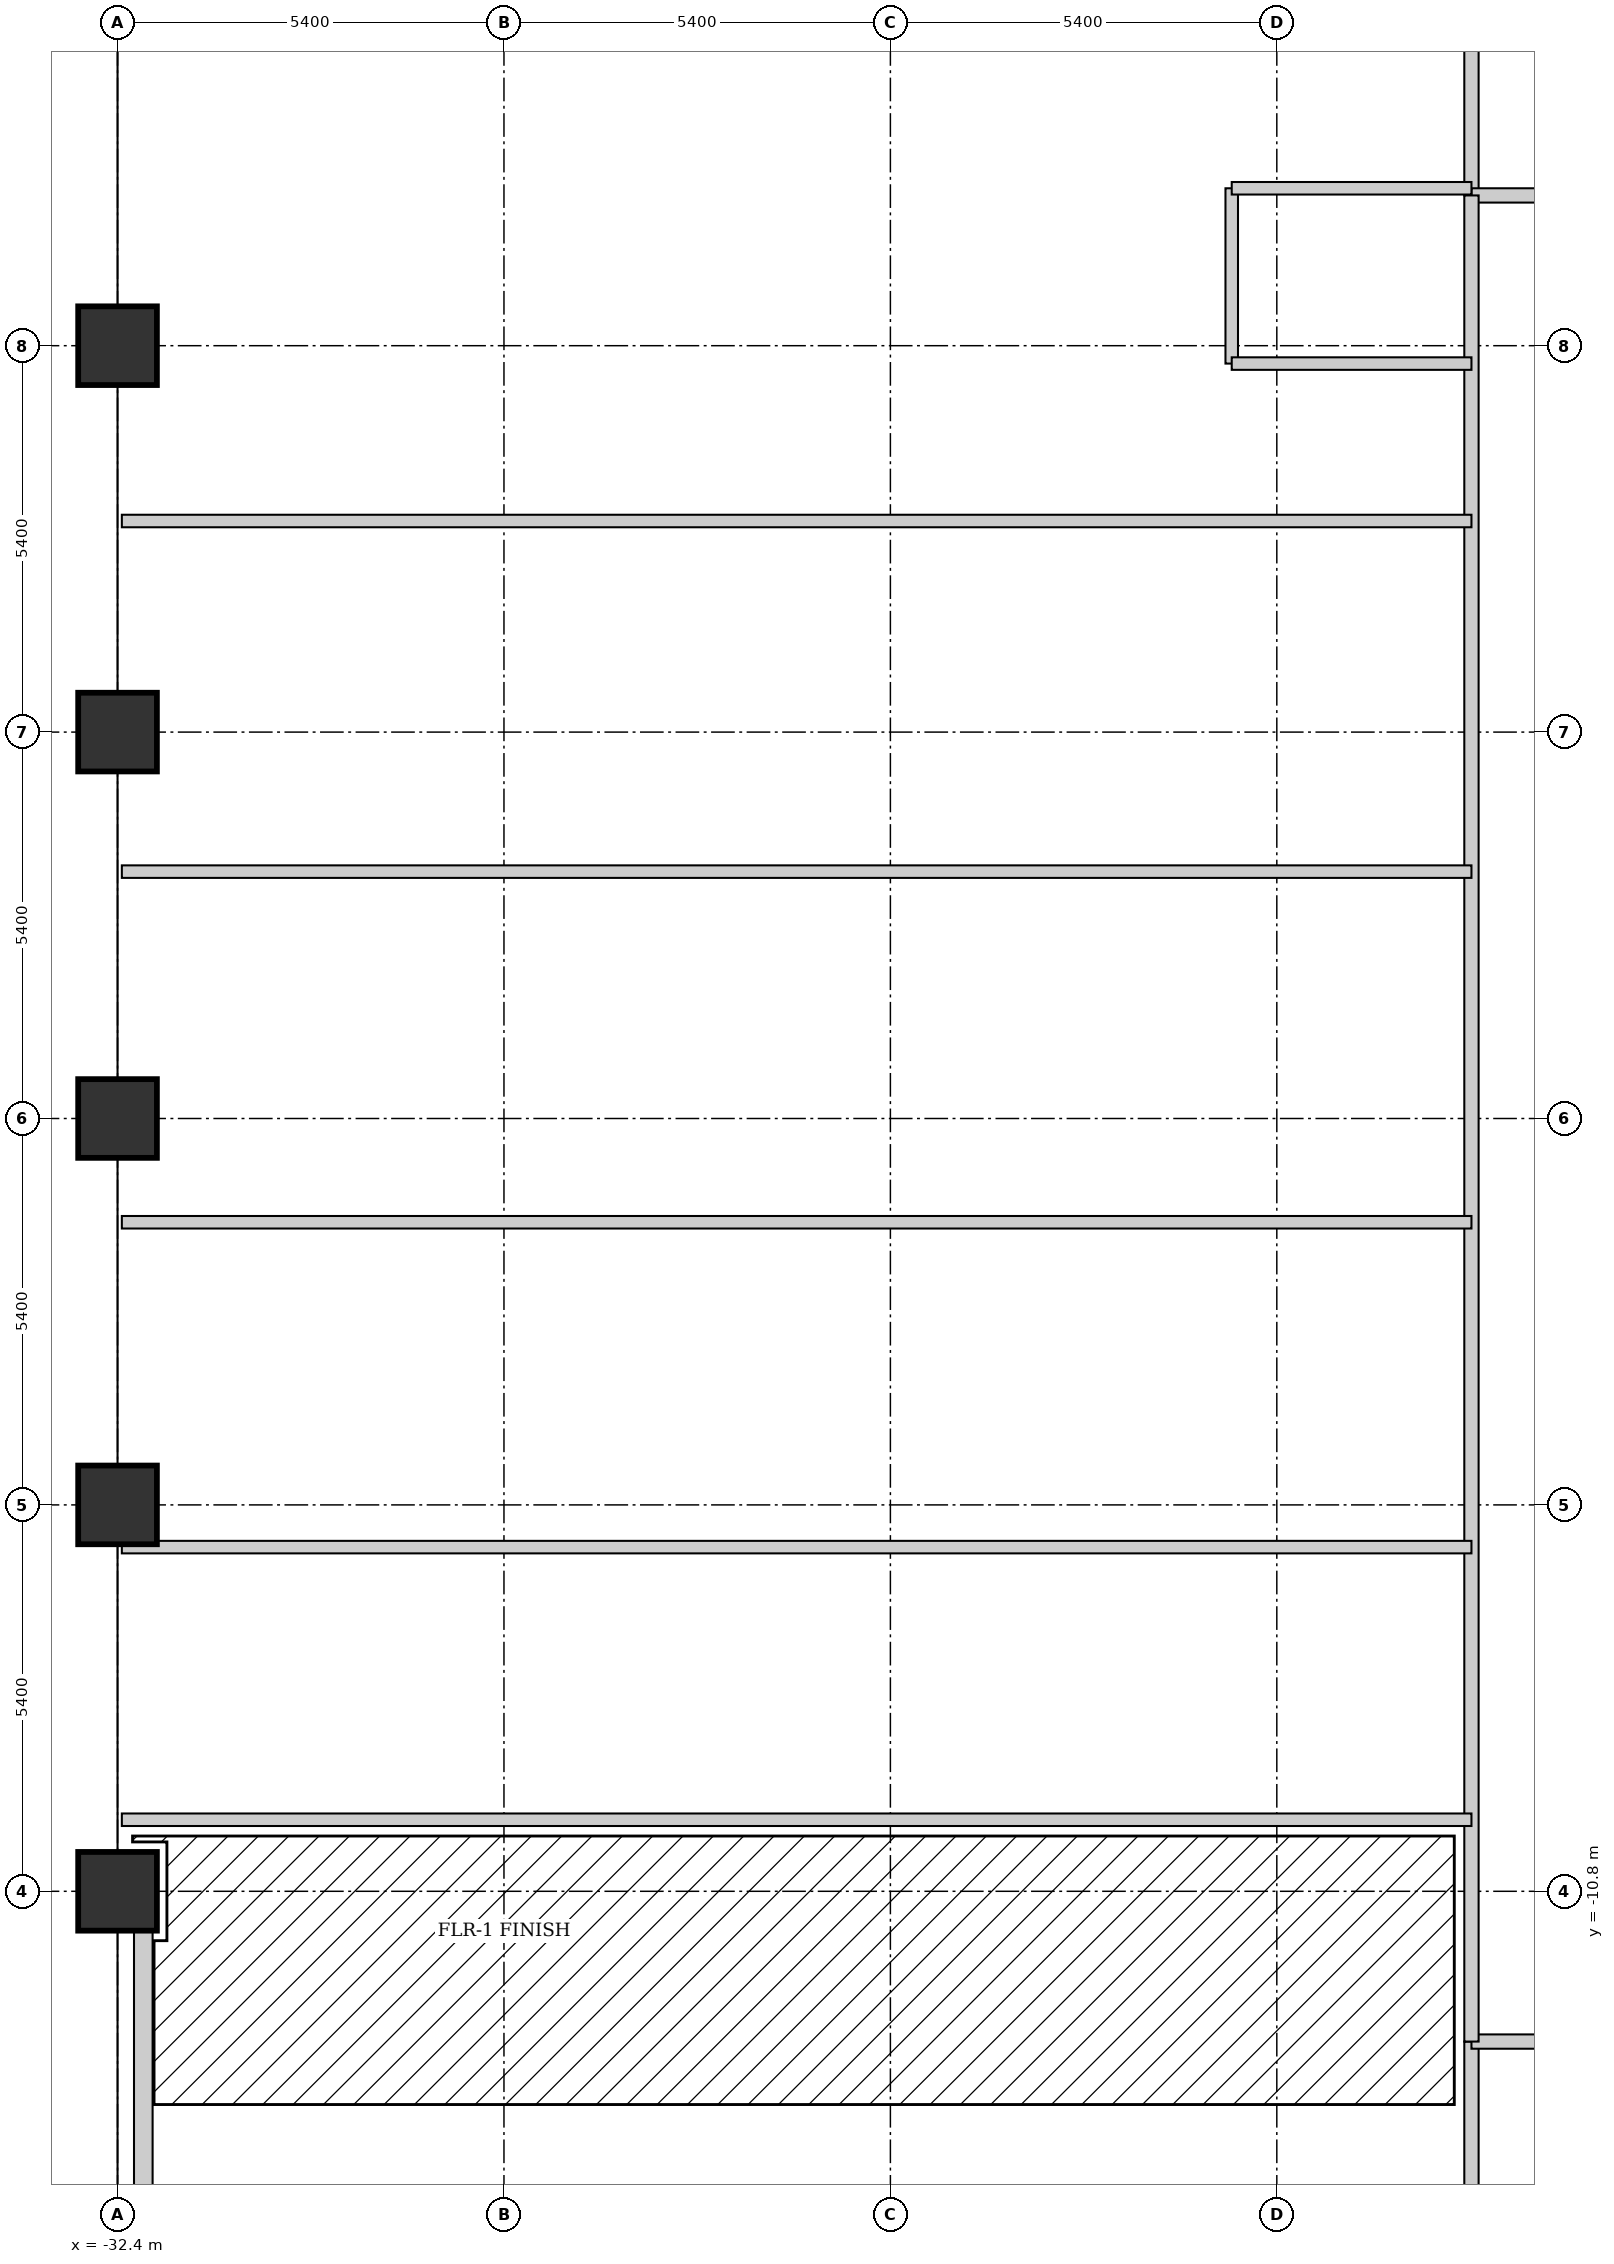
"""IFC4 building model, lengths in metres.
Left out: names, types, materials, properties, quantities, classifications, styles, units other than length and angle.
Written with IfcOpenShell. Run it as: python <this file> out.ifc"""

import sys

from ifc_helpers import new_model, si_unit, direction, frame, frame_2d, origin, origin_2d, place, context, subcontext, project, spatial, rectangle, extrude, element, fill, save


model = new_model("IFC4")
c1 = context("Model", 3, precision=1e-05, world=origin(), true_north=direction((0.0, 1.0)))
c2 = subcontext(c1, "Body", "Model", "MODEL_VIEW")
j1 = project(units=[si_unit("LENGTHUNIT", "METRE"), si_unit("PLANEANGLEUNIT", "RADIAN")], contexts=[c1])
p1 = place(None, origin())
s1 = spatial("IfcSite", under=j1, at=p1, CompositionType="ELEMENT")
p2 = place(p1, origin())
s2 = spatial("IfcBuilding", under=s1, at=p2, CompositionType="ELEMENT")
p3 = place(p2, frame((0.0, 0.0, 83.25)))
s3 = spatial("IfcBuildingStorey", under=s2, at=p3, CompositionType="ELEMENT", Elevation=83.25)
for number, where, z_axis, x_axis in (
    (1, (-32.4, -10.8, 0.0), (0.0, 0.0, 1.0), (1.0, 0.0, 0.0)),
    (2, (-32.4, -5.4, 0.0), (0.0, 0.0, 1.0), (1.0, 0.0, 0.0)),
    (3, (-32.4, 0.0, 0.0), (0.0, 0.0, 1.0), (1.0, 0.0, 0.0)),
    (4, (-32.4, 5.4, 0.0), (0.0, 0.0, 1.0), (1.0, 0.0, 0.0)),
    (5, (-32.4, 10.8, 0.0), (0.0, 0.0, 1.0), (1.0, 0.0, 0.0)),
):
    element("IfcColumn", number, at=place(p3, frame(where, z_axis=z_axis, x_axis=x_axis)), inside=s3, PredefinedType="COLUMN", context=c2, shape_type="SweptSolid", body=[
        extrude(rectangle(XDim=1.1, YDim=1.1, at=origin_2d()), origin(), (0.0, 0.0, 1.0), 3.75),
    ])
p4 = place(p3, frame((-32.04, -11.348, 0.0), z_axis=(0.0, 0.0, 1.0), x_axis=(0.0, -1.0, 0.0)))
e6 = element("IfcWall", 6, at=p4, inside=s3, PredefinedType="STANDARD", context=c2, shape_type="SweptSolid", body=[
    extrude(rectangle(XDim=4.304, YDim=0.26, at=frame_2d((2.152, 0.0))), origin(), (0.0, 0.0, 1.0), 2.699),
])
for number, where, z_axis, x_axis in (
    (7, (-13.48, 12.9, 0.0), (0.0, 0.0, 1.0), (0.0, 1.0, 0.0)),
    (8, (-13.48, -25.84, 0.0), (0.0, 0.0, 1.0), (0.0, 1.0, 0.0)),
):
    element("IfcWall", number, at=place(p3, frame(where, z_axis=z_axis, x_axis=x_axis)), inside=s3, PredefinedType="PARTITIONING", context=c2, shape_type="SweptSolid", body=[
        extrude(rectangle(XDim=12.94, YDim=0.2, at=frame_2d((6.47, 0.0))), origin(), (0.0, 0.0, 1.0), 2.699),
    ])
p5 = place(p3, frame((-13.48, 12.9, 0.0), z_axis=(0.0, 0.0, 1.0), x_axis=(1.0, 0.0, 0.0)))
e9 = element("IfcWall", 9, at=p5, inside=s3, PredefinedType="PARTITIONING", context=c2, shape_type="SweptSolid", body=[
    extrude(rectangle(XDim=12.18, YDim=0.2, at=frame_2d((6.09, 0.0))), origin(), (0.0, 0.0, 1.0), 2.933),
])
p6 = place(p5, frame((1.255, 0.0, 0.0)))
e10 = element("IfcOpeningElement", 10, at=p6, cuts=e9, PredefinedType="OPENING", context=c2, shape_type="SweptSolid", body=[
    extrude(rectangle(XDim=0.85, YDim=2.1, at=frame_2d((0.425, 1.05))), frame((0.0, 0.11, 0.0), z_axis=(0.0, -1.0, 0.0), x_axis=(1.0, 0.0, 0.0)), (0.0, 0.0, 1.0), 0.22),
])
p7 = place(p5, frame((4.9, 0.0, 0.0)))
e11 = element("IfcOpeningElement", 11, at=p7, cuts=e9, PredefinedType="OPENING", context=c2, shape_type="SweptSolid", body=[
    extrude(rectangle(XDim=0.95, YDim=2.1, at=frame_2d((0.475, 1.05))), frame((0.0, 0.11, 0.0), z_axis=(0.0, -1.0, 0.0), x_axis=(1.0, 0.0, 0.0)), (0.0, 0.0, 1.0), 0.22),
])
p8 = place(p3, frame((-13.48, -12.9, 0.0), z_axis=(0.0, 0.0, 1.0), x_axis=(1.0, 0.0, 0.0)))
e12 = element("IfcWall", 12, at=p8, inside=s3, PredefinedType="PARTITIONING", context=c2, shape_type="SweptSolid", body=[
    extrude(rectangle(XDim=24.58, YDim=0.2, at=frame_2d((12.29, 0.0))), origin(), (0.0, 0.0, 1.0), 2.933),
])
p9 = place(p8, frame((5.695, 0.0, 0.0)))
e13 = element("IfcOpeningElement", 13, at=p9, cuts=e12, PredefinedType="OPENING", context=c2, shape_type="SweptSolid", body=[
    extrude(rectangle(XDim=0.85, YDim=2.1, at=frame_2d((0.425, 1.05))), frame((0.0, 0.11, 0.0), z_axis=(0.0, -1.0, 0.0), x_axis=(1.0, 0.0, 0.0)), (0.0, 0.0, 1.0), 0.22),
])
p10 = place(p8, frame((15.794, 0.0, 0.0)))
e14 = element("IfcOpeningElement", 14, at=p10, cuts=e12, PredefinedType="OPENING", context=c2, shape_type="SweptSolid", body=[
    extrude(rectangle(XDim=0.85, YDim=2.1, at=frame_2d((0.425, 1.05))), frame((0.0, 0.11, 0.0), z_axis=(0.0, -1.0, 0.0), x_axis=(1.0, 0.0, 0.0)), (0.0, 0.0, 1.0), 0.22),
])
p11 = place(p3, frame((-13.48, -12.9, 0.0), z_axis=(0.0, 0.0, 1.0), x_axis=(0.0, 1.0, 0.0)))
e15 = element("IfcWall", 15, at=p11, inside=s3, PredefinedType="PARTITIONING", context=c2, shape_type="SweptSolid", body=[
    extrude(rectangle(XDim=25.8, YDim=0.2, at=frame_2d((12.9, 0.0))), origin(), (0.0, 0.0, 1.0), 3.57),
])
p12 = place(p11, frame((1.07, 0.0, 0.0)))
e16 = element("IfcOpeningElement", 16, at=p12, cuts=e15, PredefinedType="OPENING", context=c2, shape_type="SweptSolid", body=[
    extrude(rectangle(XDim=0.95, YDim=2.1, at=frame_2d((0.475, 1.05))), frame((0.0, 0.11, 0.0), z_axis=(0.0, -1.0, 0.0), x_axis=(1.0, 0.0, 0.0)), (0.0, 0.0, 1.0), 0.22),
])
p13 = place(p11, frame((24.205, 0.0, 0.0)))
e17 = element("IfcOpeningElement", 17, at=p13, cuts=e15, PredefinedType="OPENING", context=c2, shape_type="SweptSolid", body=[
    extrude(rectangle(XDim=0.85, YDim=2.1, at=frame_2d((0.425, 1.05))), frame((0.0, 0.11, 0.0), z_axis=(0.0, -1.0, 0.0), x_axis=(1.0, 0.0, 0.0)), (0.0, 0.0, 1.0), 0.22),
])
p14 = place(p11, frame((21.87, 0.0, 0.0)))
e18 = element("IfcOpeningElement", 18, at=p14, cuts=e15, PredefinedType="OPENING", context=c2, shape_type="SweptSolid", body=[
    extrude(rectangle(XDim=0.95, YDim=2.1, at=frame_2d((0.475, 1.05))), frame((0.0, 0.11, 0.0), z_axis=(0.0, -1.0, 0.0), x_axis=(1.0, 0.0, 0.0)), (0.0, 0.0, 1.0), 0.22),
])
p15 = place(p11, frame((4.525, 0.0, 0.0)))
e19 = element("IfcOpeningElement", 19, at=p15, cuts=e15, PredefinedType="OPENING", context=c2, shape_type="SweptSolid", body=[
    extrude(rectangle(XDim=0.95, YDim=2.1, at=frame_2d((0.475, 1.05))), frame((0.0, 0.11, 0.0), z_axis=(0.0, -1.0, 0.0), x_axis=(1.0, 0.0, 0.0)), (0.0, 0.0, 1.0), 0.22),
])
p16 = place(p11, frame((8.7, 0.0, 0.0)))
e20 = element("IfcOpeningElement", 20, at=p16, cuts=e15, PredefinedType="OPENING", context=c2, shape_type="SweptSolid", body=[
    extrude(rectangle(XDim=0.95, YDim=2.1, at=frame_2d((0.475, 1.05))), frame((0.0, 0.11, 0.0), z_axis=(0.0, -1.0, 0.0), x_axis=(1.0, 0.0, 0.0)), (0.0, 0.0, 1.0), 0.22),
])
p17 = place(p11, frame((13.42, 0.0, 0.0)))
e21 = element("IfcOpeningElement", 21, at=p17, cuts=e15, PredefinedType="OPENING", context=c2, shape_type="SweptSolid", body=[
    extrude(rectangle(XDim=0.95, YDim=2.1, at=frame_2d((0.475, 1.05))), frame((0.0, 0.11, 0.0), z_axis=(0.0, -1.0, 0.0), x_axis=(1.0, 0.0, 0.0)), (0.0, 0.0, 1.0), 0.22),
])
p18 = place(p11, frame((18.32, 0.0, 0.0)))
e22 = element("IfcOpeningElement", 22, at=p18, cuts=e15, PredefinedType="OPENING", context=c2, shape_type="SweptSolid", body=[
    extrude(rectangle(XDim=0.95, YDim=2.1, at=frame_2d((0.475, 1.05))), frame((0.0, 0.11, 0.0), z_axis=(0.0, -1.0, 0.0), x_axis=(1.0, 0.0, 0.0)), (0.0, 0.0, 1.0), 0.22),
])
for number, where, z_axis, x_axis in (
    (23, (-32.34, -5.99, 0.0), (0.0, 0.0, 1.0), (1.0, 0.0, 0.0)),
    (24, (-32.34, -1.45, 0.0), (0.0, 0.0, 1.0), (1.0, 0.0, 0.0)),
    (25, (-32.34, 3.45, 0.0), (0.0, 0.0, 1.0), (1.0, 0.0, 0.0)),
):
    element("IfcWall", number, at=place(p3, frame(where, z_axis=z_axis, x_axis=x_axis)), inside=s3, PredefinedType="PARTITIONING", context=c2, shape_type="SweptSolid", body=[
        extrude(rectangle(XDim=18.86, YDim=0.175, at=frame_2d((9.43, 0.0))), origin(), (0.0, 0.0, 1.0), 2.699),
    ])
p19 = place(p3, frame((-16.83, 10.55, 0.0), z_axis=(0.0, 0.0, 1.0), x_axis=(0.0, 1.0, 0.0)))
e26 = element("IfcWall", 26, at=p19, inside=s3, PredefinedType="PARTITIONING", context=c2, shape_type="SweptSolid", body=[
    extrude(rectangle(XDim=2.45, YDim=0.175, at=frame_2d((1.225, 0.0))), origin(), (0.0, 0.0, 1.0), 3.57),
])
for number, where, z_axis, x_axis in (
    (27, (-16.83, 13.0, 0.0), (0.0, 0.0, 1.0), (1.0, 0.0, 0.0)),
    (28, (-16.83, 10.55, 0.0), (0.0, 0.0, 1.0), (1.0, 0.0, 0.0)),
):
    element("IfcWall", number, at=place(p3, frame(where, z_axis=z_axis, x_axis=x_axis)), inside=s3, PredefinedType="PARTITIONING", context=c2, shape_type="SweptSolid", body=[
        extrude(rectangle(XDim=3.35, YDim=0.175, at=frame_2d((1.675, 0.0))), origin(), (0.0, 0.0, 1.0), 3.57),
    ])
for number, where, z_axis, x_axis in (
    (29, (-32.34, -9.8, 0.0), (0.0, 0.0, 1.0), (1.0, 0.0, 0.0)),
    (30, (-32.34, 8.35, 0.0), (0.0, 0.0, 1.0), (1.0, 0.0, 0.0)),
):
    element("IfcWall", number, at=place(p3, frame(where, z_axis=z_axis, x_axis=x_axis)), inside=s3, PredefinedType="PARTITIONING", context=c2, shape_type="SweptSolid", body=[
        extrude(rectangle(XDim=18.86, YDim=0.175, at=frame_2d((9.43, 0.0))), origin(), (0.0, 0.0, 1.0), 2.699),
    ])
p20 = place(p12, origin())
e31 = element("IfcDoor", 31, at=p20, inside=s3, OperationType="SINGLE_SWING_RIGHT", PredefinedType="DOOR", context=c2, shape_type="SweptSolid", body=[
    extrude(rectangle(XDim=0.95, YDim=2.1, at=frame_2d((0.475, 1.05))), frame((0.0, 0.025, 0.0), z_axis=(0.0, -1.0, 0.0), x_axis=(1.0, 0.0, 0.0)), (0.0, 0.0, 1.0), 0.05),
])
fill(e16, e31)
p21 = place(p13, origin())
e32 = element("IfcDoor", 32, at=p21, inside=s3, OperationType="SINGLE_SWING_LEFT", PredefinedType="DOOR", context=c2, shape_type="SweptSolid", body=[
    extrude(rectangle(XDim=0.85, YDim=2.1, at=frame_2d((0.425, 1.05))), frame((0.0, 0.025, 0.0), z_axis=(0.0, -1.0, 0.0), x_axis=(1.0, 0.0, 0.0)), (0.0, 0.0, 1.0), 0.05),
])
fill(e17, e32)
p22 = place(p14, origin())
e33 = element("IfcDoor", 33, at=p22, inside=s3, OperationType="SINGLE_SWING_RIGHT", PredefinedType="DOOR", context=c2, shape_type="SweptSolid", body=[
    extrude(rectangle(XDim=0.95, YDim=2.1, at=frame_2d((0.475, 1.05))), frame((0.0, 0.025, 0.0), z_axis=(0.0, -1.0, 0.0), x_axis=(1.0, 0.0, 0.0)), (0.0, 0.0, 1.0), 0.05),
])
fill(e18, e33)
p23 = place(p15, origin())
e34 = element("IfcDoor", 34, at=p23, inside=s3, OperationType="SINGLE_SWING_LEFT", PredefinedType="DOOR", context=c2, shape_type="SweptSolid", body=[
    extrude(rectangle(XDim=0.95, YDim=2.1, at=frame_2d((0.475, 1.05))), frame((0.0, 0.025, 0.0), z_axis=(0.0, -1.0, 0.0), x_axis=(1.0, 0.0, 0.0)), (0.0, 0.0, 1.0), 0.05),
])
fill(e19, e34)
p24 = place(p16, origin())
e35 = element("IfcDoor", 35, at=p24, inside=s3, OperationType="SINGLE_SWING_RIGHT", PredefinedType="DOOR", context=c2, shape_type="SweptSolid", body=[
    extrude(rectangle(XDim=0.95, YDim=2.1, at=frame_2d((0.475, 1.05))), frame((0.0, 0.025, 0.0), z_axis=(0.0, -1.0, 0.0), x_axis=(1.0, 0.0, 0.0)), (0.0, 0.0, 1.0), 0.05),
])
fill(e20, e35)
p25 = place(p17, origin())
e36 = element("IfcDoor", 36, at=p25, inside=s3, OperationType="SINGLE_SWING_LEFT", PredefinedType="DOOR", context=c2, shape_type="SweptSolid", body=[
    extrude(rectangle(XDim=0.95, YDim=2.1, at=frame_2d((0.475, 1.05))), frame((0.0, 0.025, 0.0), z_axis=(0.0, -1.0, 0.0), x_axis=(1.0, 0.0, 0.0)), (0.0, 0.0, 1.0), 0.05),
])
fill(e21, e36)
p26 = place(p18, origin())
e37 = element("IfcDoor", 37, at=p26, inside=s3, OperationType="SINGLE_SWING_RIGHT", PredefinedType="DOOR", context=c2, shape_type="SweptSolid", body=[
    extrude(rectangle(XDim=0.95, YDim=2.1, at=frame_2d((0.475, 1.05))), frame((0.0, 0.025, 0.0), z_axis=(0.0, -1.0, 0.0), x_axis=(1.0, 0.0, 0.0)), (0.0, 0.0, 1.0), 0.05),
])
fill(e22, e37)
save(model, sys.argv[1])
